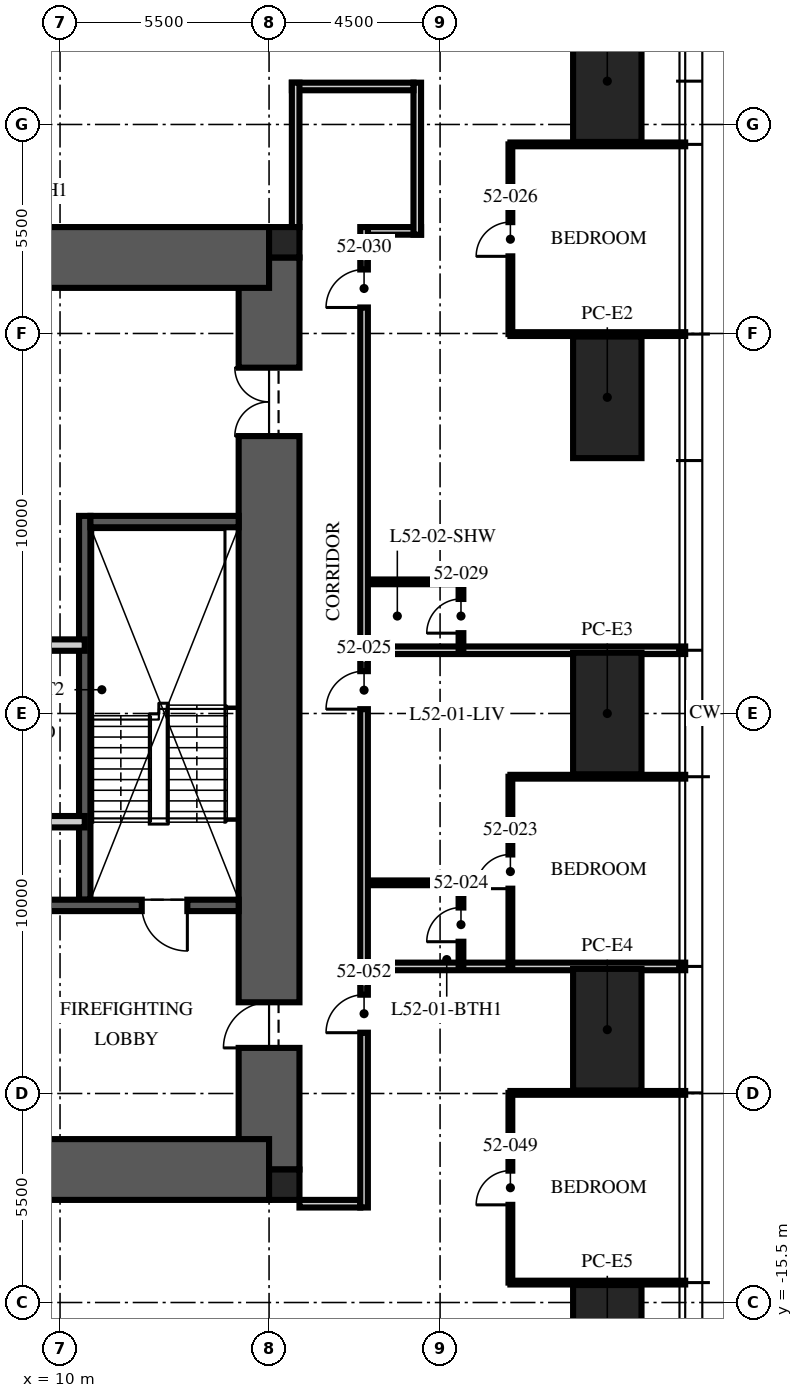
"""IFC4 building model, lengths in metres.
Left out: names, types, materials, properties, quantities, classifications, styles, units other than length and angle.
Written with IfcOpenShell. Run it as: python <this file> out.ifc"""

import sys

from ifc_helpers import new_model, si_unit, direction, frame, frame_2d, origin, origin_2d, place, context, subcontext, project, spatial, rectangle, hollow_rectangle, extrude, element, fill, save


model = new_model("IFC4")
c1 = context("Model", 3, precision=1e-05, world=origin(), true_north=direction((0.0, 1.0)))
c2 = subcontext(c1, "Body", "Model", "MODEL_VIEW")
j1 = project(units=[si_unit("LENGTHUNIT", "METRE"), si_unit("PLANEANGLEUNIT", "RADIAN")], contexts=[c1])
p1 = place(None, origin())
s1 = spatial("IfcSite", under=j1, at=p1, CompositionType="ELEMENT")
p2 = place(p1, origin())
s2 = spatial("IfcBuilding", under=s1, at=p2, CompositionType="ELEMENT")
p3 = place(p2, frame((0.0, 0.0, 210.75)))
s3 = spatial("IfcBuildingStorey", under=s2, at=p3, CompositionType="ELEMENT", Elevation=210.75)
p4 = place(p3, frame((15.5, -12.0, -0.25), z_axis=(0.0, 0.0, 1.0), x_axis=(0.0, 1.0, 0.0)))
e1 = element("IfcWall", 1, at=p4, inside=s3, PredefinedType="SHEAR", context=c2, shape_type="SweptSolid", body=[
    extrude(rectangle(XDim=24.0, YDim=1.6, at=frame_2d((12.0, 0.0))), origin(), (0.0, 0.0, 1.0), 3.75),
])
p5 = place(p4, frame((3.2, 0.0, 0.25)))
e2 = element("IfcOpeningElement", 2, at=p5, cuts=e1, PredefinedType="OPENING", context=c2, shape_type="SweptSolid", body=[
    extrude(rectangle(XDim=1.2, YDim=2.1, at=frame_2d((0.6, 1.05))), frame((0.0, 0.81, 0.0), z_axis=(0.0, -1.0, 0.0), x_axis=(1.0, 0.0, 0.0)), (0.0, 0.0, 1.0), 1.62),
])
p6 = place(p4, frame((19.3, 0.0, 0.25)))
e3 = element("IfcOpeningElement", 3, at=p6, cuts=e1, PredefinedType="OPENING", context=c2, shape_type="SweptSolid", body=[
    extrude(rectangle(XDim=1.8, YDim=2.1, at=frame_2d((0.9, 1.05))), frame((0.0, 0.81, 0.0), z_axis=(0.0, -1.0, 0.0), x_axis=(1.0, 0.0, 0.0)), (0.0, 0.0, 1.0), 1.62),
])
for number, where, z_axis, x_axis in (
    (4, (-15.5, 12.0, -0.25), (0.0, 0.0, 1.0), (1.0, 0.0, 0.0)),
    (5, (-15.5, -12.0, -0.25), (0.0, 0.0, 1.0), (1.0, 0.0, 0.0)),
):
    element("IfcWall", number, at=place(p3, frame(where, z_axis=z_axis, x_axis=x_axis)), inside=s3, PredefinedType="SHEAR", context=c2, shape_type="SweptSolid", body=[
        extrude(rectangle(XDim=31.0, YDim=1.6, at=frame_2d((15.5, 0.0))), origin(), (0.0, 0.0, 1.0), 3.75),
    ])
for number, where, z_axis, x_axis in (
    (6, (15.9, 12.4, -0.25), (0.0, 0.0, 1.0), (1.0, 0.0, 0.0)),
    (7, (15.9, -12.4, -0.25), (0.0, 0.0, 1.0), (1.0, 0.0, 0.0)),
):
    element("IfcColumn", number, at=place(p3, frame(where, z_axis=z_axis, x_axis=x_axis)), inside=s3, PredefinedType="COLUMN", context=c2, shape_type="SweptSolid", body=[
        extrude(rectangle(XDim=0.8, YDim=0.8, at=origin_2d()), origin(), (0.0, 0.0, 1.0), 3.75),
    ])
for number, where, z_axis, x_axis in (
    (8, (24.4, 16.64, 0.0), (0.0, 0.0, 1.0), (0.0, 1.0, 0.0)),
    (9, (24.4, 8.32, 0.0), (0.0, 0.0, 1.0), (0.0, 1.0, 0.0)),
    (10, (24.4, 0.0, 0.0), (0.0, 0.0, 1.0), (0.0, 1.0, 0.0)),
    (11, (24.4, -8.32, 0.0), (0.0, 0.0, 1.0), (0.0, 1.0, 0.0)),
    (12, (24.4, -16.64, 0.0), (0.0, 0.0, 1.0), (0.0, 1.0, 0.0)),
):
    element("IfcColumn", number, at=place(p3, frame(where, z_axis=z_axis, x_axis=x_axis)), inside=s3, PredefinedType="COLUMN", context=c2, shape_type="SweptSolid", body=[
        extrude(hollow_rectangle(XDim=3.2, YDim=1.8, WallThickness=0.2, at=origin_2d()), origin(), (0.0, 0.0, 1.0), 3.75),
    ])
p7 = place(p3, frame((10.65, -4.9, 0.0), z_axis=(0.0, 0.0, 1.0), x_axis=(0.0, 1.0, 0.0)))
e13 = element("IfcWall", 13, at=p7, inside=s3, PredefinedType="SOLIDWALL", context=c2, shape_type="SweptSolid", body=[
    extrude(rectangle(XDim=10.1, YDim=0.3, at=frame_2d((5.05, 0.0))), origin(), (0.0, 0.0, 1.0), 3.5),
])
p8 = place(p3, frame((14.7, -5.05, 0.0), z_axis=(0.0, 0.0, 1.0), x_axis=(-1.0, 0.0, 0.0)))
e14 = element("IfcWall", 14, at=p8, inside=s3, PredefinedType="SOLIDWALL", context=c2, shape_type="SweptSolid", body=[
    extrude(rectangle(XDim=5.9, YDim=0.3, at=frame_2d((2.95, 0.0))), origin(), (0.0, 0.0, 1.0), 3.5),
])
p9 = place(p8, frame((1.35, 0.0, 0.0)))
e15 = element("IfcOpeningElement", 15, at=p9, cuts=e14, PredefinedType="OPENING", context=c2, shape_type="SweptSolid", body=[
    extrude(rectangle(XDim=1.2, YDim=2.1, at=frame_2d((0.6, 1.05))), frame((0.0, 0.16, 0.0), z_axis=(0.0, -1.0, 0.0), x_axis=(1.0, 0.0, 0.0)), (0.0, 0.0, 1.0), 0.32),
])
p10 = place(p3, frame((14.7, 5.05, 0.0), z_axis=(0.0, 0.0, 1.0), x_axis=(-1.0, 0.0, 0.0)))
e16 = element("IfcWall", 16, at=p10, inside=s3, PredefinedType="SOLIDWALL", context=c2, shape_type="SweptSolid", body=[
    extrude(rectangle(XDim=3.9, YDim=0.3, at=frame_2d((1.95, 0.0))), origin(), (0.0, 0.0, 1.0), 3.5),
])
p11 = place(p3, frame((-10.65, 1.8, 0.0), z_axis=(0.0, 0.0, 1.0), x_axis=(1.0, 0.0, 0.0)))
e17 = element("IfcWall", 17, at=p11, inside=s3, PredefinedType="PARTITIONING", context=c2, shape_type="SweptSolid", body=[
    extrude(rectangle(XDim=21.3, YDim=0.3, at=frame_2d((10.65, 0.0))), origin(), (0.0, 0.0, 1.0), 3.5),
])
p12 = place(p11, frame((10.05, 0.0, 0.0)))
e18 = element("IfcOpeningElement", 18, at=p12, cuts=e17, PredefinedType="OPENING", context=c2, shape_type="SweptSolid", body=[
    extrude(rectangle(XDim=1.2, YDim=2.1, at=frame_2d((0.6, 1.05))), frame((0.0, 0.16, 0.0), z_axis=(0.0, -1.0, 0.0), x_axis=(1.0, 0.0, 0.0)), (0.0, 0.0, 1.0), 0.32),
])
p13 = place(p11, frame((19.238, 0.0, 0.0)))
e19 = element("IfcOpeningElement", 19, at=p13, cuts=e17, PredefinedType="OPENING", context=c2, shape_type="SweptSolid", body=[
    extrude(rectangle(XDim=0.9, YDim=2.1, at=frame_2d((0.45, 1.05))), frame((0.0, 0.16, 0.0), z_axis=(0.0, -1.0, 0.0), x_axis=(1.0, 0.0, 0.0)), (0.0, 0.0, 1.0), 0.32),
])
p14 = place(p3, frame((10.65, -2.848, 0.0), z_axis=(0.0, 0.0, 1.0), x_axis=(-1.0, 0.0, 0.0)))
e20 = element("IfcWall", 20, at=p14, inside=s3, PredefinedType="PARTITIONING", context=c2, shape_type="SweptSolid", body=[
    extrude(rectangle(XDim=6.45, YDim=0.3, at=frame_2d((3.225, 0.0))), origin(), (0.0, 0.0, 1.0), 3.5),
])
p15 = place(p3, frame((18.1, 12.7, 0.0), z_axis=(0.0, 0.0, 1.0), x_axis=(1.0, 0.0, 0.0)))
e21 = element("IfcWall", 21, at=p15, inside=s3, PredefinedType="PARTITIONING", context=c2, shape_type="SweptSolid", body=[
    extrude(rectangle(XDim=1.4, YDim=0.2, at=frame_2d((0.7, 0.0))), origin(), (0.0, 0.0, 1.0), 2.81),
])
p16 = place(p3, frame((19.4, 12.6, 0.0), z_axis=(0.0, 0.0, 1.0), x_axis=(0.0, 1.0, 0.0)))
e22 = element("IfcWall", 22, at=p16, inside=s3, PredefinedType="PARTITIONING", context=c2, shape_type="SweptSolid", body=[
    extrude(rectangle(XDim=4.0, YDim=0.2, at=frame_2d((2.0, 0.0))), origin(), (0.0, 0.0, 1.0), 2.6),
])
p17 = place(p3, frame((19.3, 16.5, 0.0), z_axis=(0.0, 0.0, 1.0), x_axis=(-1.0, 0.0, 0.0)))
e23 = element("IfcWall", 23, at=p17, inside=s3, PredefinedType="PARTITIONING", context=c2, shape_type="SweptSolid", body=[
    extrude(rectangle(XDim=3.2, YDim=0.2, at=frame_2d((1.6, 0.0))), origin(), (0.0, 0.0, 1.0), 2.3),
])
p18 = place(p3, frame((16.2, 16.6, 0.0), z_axis=(0.0, 0.0, 1.0), x_axis=(0.0, -1.0, 0.0)))
e24 = element("IfcWall", 24, at=p18, inside=s3, PredefinedType="PARTITIONING", context=c2, shape_type="SweptSolid", body=[
    extrude(rectangle(XDim=3.8, YDim=0.2, at=frame_2d((1.9, 0.0))), origin(), (0.0, 0.0, 1.0), 2.3),
])
p19 = place(p3, frame((16.3, -12.9, 0.0), z_axis=(0.0, 0.0, 1.0), x_axis=(1.0, 0.0, 0.0)))
e25 = element("IfcWall", 25, at=p19, inside=s3, PredefinedType="PARTITIONING", context=c2, shape_type="SweptSolid", body=[
    extrude(rectangle(XDim=1.6, YDim=0.2, at=frame_2d((0.8, 0.0))), origin(), (0.0, 0.0, 1.0), 2.3),
])
p20 = place(p3, frame((18.1, -6.656, 0.0), z_axis=(0.0, 0.0, 1.0), x_axis=(1.0, 0.0, 0.0)))
e26 = element("IfcWall", 26, at=p20, inside=s3, PredefinedType="PARTITIONING", context=c2, shape_type="SweptSolid", body=[
    extrude(rectangle(XDim=8.35, YDim=0.2, at=frame_2d((4.175, 0.0))), origin(), (0.0, 0.0, 1.0), 2.91),
])
p21 = place(p3, frame((21.85, -1.664, 0.0), z_axis=(0.0, 0.0, 1.0), x_axis=(1.0, 0.0, 0.0)))
e27 = element("IfcWall", 27, at=p21, inside=s3, PredefinedType="PARTITIONING", context=c2, shape_type="SweptSolid", body=[
    extrude(rectangle(XDim=4.6, YDim=0.1, at=frame_2d((2.3, 0.0))), origin(), (0.0, 0.0, 1.0), 2.91),
])
p22 = place(p3, frame((18.1, 1.664, 0.0), z_axis=(0.0, 0.0, 1.0), x_axis=(1.0, 0.0, 0.0)))
e28 = element("IfcWall", 28, at=p22, inside=s3, PredefinedType="PARTITIONING", context=c2, shape_type="SweptSolid", body=[
    extrude(rectangle(XDim=8.35, YDim=0.2, at=frame_2d((4.175, 0.0))), origin(), (0.0, 0.0, 1.0), 2.91),
])
for number, where, z_axis, x_axis in (
    (29, (21.85, 9.984, 0.0), (0.0, 0.0, 1.0), (1.0, 0.0, 0.0)),
    (30, (21.85, 14.976, 0.0), (0.0, 0.0, 1.0), (1.0, 0.0, 0.0)),
    (31, (21.85, -14.976, 0.0), (0.0, 0.0, 1.0), (1.0, 0.0, 0.0)),
    (32, (21.85, -9.984, 0.0), (0.0, 0.0, 1.0), (1.0, 0.0, 0.0)),
):
    element("IfcWall", number, at=place(p3, frame(where, z_axis=z_axis, x_axis=x_axis)), inside=s3, PredefinedType="PARTITIONING", context=c2, shape_type="SweptSolid", body=[
        extrude(rectangle(XDim=4.6, YDim=0.1, at=frame_2d((2.3, 0.0))), origin(), (0.0, 0.0, 1.0), 2.91),
    ])
p23 = place(p3, frame((21.85, -6.656, 0.0), z_axis=(0.0, 0.0, 1.0), x_axis=(0.0, 1.0, 0.0)))
e33 = element("IfcWall", 33, at=p23, inside=s3, PredefinedType="PARTITIONING", context=c2, shape_type="SweptSolid", body=[
    extrude(rectangle(XDim=4.992, YDim=0.1, at=frame_2d((2.496, 0.0))), origin(), (0.0, 0.0, 1.0), 2.81),
])
p24 = place(p23, frame((2.046, 0.0, 0.0)))
e34 = element("IfcOpeningElement", 34, at=p24, cuts=e33, PredefinedType="OPENING", context=c2, shape_type="SweptSolid", body=[
    extrude(rectangle(XDim=0.9, YDim=2.1, at=frame_2d((0.45, 1.05))), frame((0.0, 0.06, 0.0), z_axis=(0.0, -1.0, 0.0), x_axis=(1.0, 0.0, 0.0)), (0.0, 0.0, 1.0), 0.12),
])
p25 = place(p3, frame((20.55, -6.656, 0.0), z_axis=(0.0, 0.0, 1.0), x_axis=(0.0, 1.0, 0.0)))
e35 = element("IfcWall", 35, at=p25, inside=s3, PredefinedType="PARTITIONING", context=c2, shape_type="SweptSolid", body=[
    extrude(rectangle(XDim=2.2, YDim=0.125, at=frame_2d((1.1, 0.0))), origin(), (0.0, 0.0, 1.0), 3.5),
])
p26 = place(p25, frame((0.65, 0.0, 0.0)))
e36 = element("IfcOpeningElement", 36, at=p26, cuts=e35, PredefinedType="OPENING", context=c2, shape_type="SweptSolid", body=[
    extrude(rectangle(XDim=0.9, YDim=2.1, at=frame_2d((0.45, 1.05))), frame((0.0, 0.073, 0.0), z_axis=(0.0, -1.0, 0.0), x_axis=(1.0, 0.0, 0.0)), (0.0, 0.0, 1.0), 0.145),
])
p27 = place(p3, frame((18.1, -4.456, 0.0), z_axis=(0.0, 0.0, 1.0), x_axis=(1.0, 0.0, 0.0)))
e37 = element("IfcWall", 37, at=p27, inside=s3, PredefinedType="PARTITIONING", context=c2, shape_type="SweptSolid", body=[
    extrude(rectangle(XDim=2.45, YDim=0.125, at=frame_2d((1.225, 0.0))), origin(), (0.0, 0.0, 1.0), 3.5),
])
p28 = place(p3, frame((21.85, 9.984, 0.0), z_axis=(0.0, 0.0, 1.0), x_axis=(0.0, 1.0, 0.0)))
e38 = element("IfcWall", 38, at=p28, inside=s3, PredefinedType="PARTITIONING", context=c2, shape_type="SweptSolid", body=[
    extrude(rectangle(XDim=4.992, YDim=0.1, at=frame_2d((2.496, 0.0))), origin(), (0.0, 0.0, 1.0), 2.81),
])
p29 = place(p28, frame((2.046, 0.0, 0.0)))
e39 = element("IfcOpeningElement", 39, at=p29, cuts=e38, PredefinedType="OPENING", context=c2, shape_type="SweptSolid", body=[
    extrude(rectangle(XDim=0.9, YDim=2.1, at=frame_2d((0.45, 1.05))), frame((0.0, 0.06, 0.0), z_axis=(0.0, -1.0, 0.0), x_axis=(1.0, 0.0, 0.0)), (0.0, 0.0, 1.0), 0.12),
])
p30 = place(p3, frame((20.55, 1.664, 0.0), z_axis=(0.0, 0.0, 1.0), x_axis=(0.0, 1.0, 0.0)))
e40 = element("IfcWall", 40, at=p30, inside=s3, PredefinedType="PARTITIONING", context=c2, shape_type="SweptSolid", body=[
    extrude(rectangle(XDim=1.8, YDim=0.125, at=frame_2d((0.9, 0.0))), origin(), (0.0, 0.0, 1.0), 3.5),
])
p31 = place(p30, frame((0.45, 0.0, 0.0)))
e41 = element("IfcOpeningElement", 41, at=p31, cuts=e40, PredefinedType="OPENING", context=c2, shape_type="SweptSolid", body=[
    extrude(rectangle(XDim=0.9, YDim=2.1, at=frame_2d((0.45, 1.05))), frame((0.0, 0.073, 0.0), z_axis=(0.0, -1.0, 0.0), x_axis=(1.0, 0.0, 0.0)), (0.0, 0.0, 1.0), 0.145),
])
p32 = place(p3, frame((18.1, 3.464, 0.0), z_axis=(0.0, 0.0, 1.0), x_axis=(1.0, 0.0, 0.0)))
e42 = element("IfcWall", 42, at=p32, inside=s3, PredefinedType="PARTITIONING", context=c2, shape_type="SweptSolid", body=[
    extrude(rectangle(XDim=2.45, YDim=0.125, at=frame_2d((1.225, 0.0))), origin(), (0.0, 0.0, 1.0), 3.5),
])
p33 = place(p3, frame((21.85, -14.976, 0.0), z_axis=(0.0, 0.0, 1.0), x_axis=(0.0, 1.0, 0.0)))
e43 = element("IfcWall", 43, at=p33, inside=s3, PredefinedType="PARTITIONING", context=c2, shape_type="SweptSolid", body=[
    extrude(rectangle(XDim=4.992, YDim=0.1, at=frame_2d((2.496, 0.0))), origin(), (0.0, 0.0, 1.0), 2.81),
])
p34 = place(p33, frame((2.046, 0.0, 0.0)))
e44 = element("IfcOpeningElement", 44, at=p34, cuts=e43, PredefinedType="OPENING", context=c2, shape_type="SweptSolid", body=[
    extrude(rectangle(XDim=0.9, YDim=2.1, at=frame_2d((0.45, 1.05))), frame((0.0, 0.06, 0.0), z_axis=(0.0, -1.0, 0.0), x_axis=(1.0, 0.0, 0.0)), (0.0, 0.0, 1.0), 0.12),
])
p35 = place(p3, frame((18.0, -13.0, 0.0), z_axis=(0.0, 0.0, 1.0), x_axis=(0.0, 1.0, 0.0)))
e45 = element("IfcWall", 45, at=p35, inside=s3, PredefinedType="PARTITIONING", context=c2, shape_type="SweptSolid", body=[
    extrude(rectangle(XDim=25.8, YDim=0.2, at=frame_2d((12.9, 0.0))), origin(), (0.0, 0.0, 1.0), 2.6),
])
p36 = place(p35, frame((13.114, 0.0, 0.0)))
e46 = element("IfcOpeningElement", 46, at=p36, cuts=e45, PredefinedType="OPENING", context=c2, shape_type="SweptSolid", body=[
    extrude(rectangle(XDim=1.0, YDim=2.2, at=frame_2d((0.5, 1.1))), frame((0.0, 0.11, 0.0), z_axis=(0.0, -1.0, 0.0), x_axis=(1.0, 0.0, 0.0)), (0.0, 0.0, 1.0), 0.22),
])
p37 = place(p35, frame((23.684, 0.0, 0.0)))
e47 = element("IfcOpeningElement", 47, at=p37, cuts=e45, PredefinedType="OPENING", context=c2, shape_type="SweptSolid", body=[
    extrude(rectangle(XDim=1.0, YDim=2.2, at=frame_2d((0.5, 1.1))), frame((0.0, 0.11, 0.0), z_axis=(0.0, -1.0, 0.0), x_axis=(1.0, 0.0, 0.0)), (0.0, 0.0, 1.0), 0.22),
])
p38 = place(p35, frame((4.6, 0.0, 0.0)))
e48 = element("IfcOpeningElement", 48, at=p38, cuts=e45, PredefinedType="OPENING", context=c2, shape_type="SweptSolid", body=[
    extrude(rectangle(XDim=1.0, YDim=2.2, at=frame_2d((0.5, 1.1))), frame((0.0, 0.11, 0.0), z_axis=(0.0, -1.0, 0.0), x_axis=(1.0, 0.0, 0.0)), (0.0, 0.0, 1.0), 0.22),
])
p39 = place(p9, origin())
e49 = element("IfcDoor", 49, at=p39, inside=s3, OperationType="SINGLE_SWING_LEFT", PredefinedType="DOOR", context=c2, shape_type="SweptSolid", body=[
    extrude(rectangle(XDim=1.2, YDim=2.1, at=frame_2d((0.6, 1.05))), frame((0.0, 0.025, 0.0), z_axis=(0.0, -1.0, 0.0), x_axis=(1.0, 0.0, 0.0)), (0.0, 0.0, 1.0), 0.05),
])
fill(e15, e49)
p40 = place(p5, origin())
e50 = element("IfcDoor", 50, at=p40, inside=s3, OperationType="SINGLE_SWING_LEFT", PredefinedType="DOOR", context=c2, shape_type="SweptSolid", body=[
    extrude(rectangle(XDim=1.2, YDim=2.1, at=frame_2d((0.6, 1.05))), frame((0.0, 0.025, 0.0), z_axis=(0.0, -1.0, 0.0), x_axis=(1.0, 0.0, 0.0)), (0.0, 0.0, 1.0), 0.05),
])
fill(e2, e50)
p41 = place(p6, origin())
e51 = element("IfcDoor", 51, at=p41, inside=s3, OperationType="DOUBLE_DOOR_SINGLE_SWING", PredefinedType="DOOR", context=c2, shape_type="SweptSolid", body=[
    extrude(rectangle(XDim=1.8, YDim=2.1, at=frame_2d((0.9, 1.05))), frame((0.0, 0.025, 0.0), z_axis=(0.0, -1.0, 0.0), x_axis=(1.0, 0.0, 0.0)), (0.0, 0.0, 1.0), 0.05),
])
fill(e3, e51)
p42 = place(p24, origin())
e52 = element("IfcDoor", 52, at=p42, inside=s3, OperationType="SINGLE_SWING_LEFT", PredefinedType="DOOR", context=c2, shape_type="SweptSolid", body=[
    extrude(rectangle(XDim=0.9, YDim=2.1, at=frame_2d((0.45, 1.05))), frame((0.0, 0.025, 0.0), z_axis=(0.0, -1.0, 0.0), x_axis=(1.0, 0.0, 0.0)), (0.0, 0.0, 1.0), 0.05),
])
fill(e34, e52)
p43 = place(p26, origin())
e53 = element("IfcDoor", 53, at=p43, inside=s3, OperationType="SINGLE_SWING_LEFT", PredefinedType="DOOR", context=c2, shape_type="SweptSolid", body=[
    extrude(rectangle(XDim=0.9, YDim=2.1, at=frame_2d((0.45, 1.05))), frame((0.0, 0.025, 0.0), z_axis=(0.0, -1.0, 0.0), x_axis=(1.0, 0.0, 0.0)), (0.0, 0.0, 1.0), 0.05),
])
fill(e36, e53)
p44 = place(p36, origin())
e54 = element("IfcDoor", 54, at=p44, inside=s3, OperationType="SINGLE_SWING_LEFT", PredefinedType="DOOR", context=c2, shape_type="SweptSolid", body=[
    extrude(rectangle(XDim=1.0, YDim=2.2, at=frame_2d((0.5, 1.1))), frame((0.0, 0.025, 0.0), z_axis=(0.0, -1.0, 0.0), x_axis=(1.0, 0.0, 0.0)), (0.0, 0.0, 1.0), 0.05),
])
fill(e46, e54)
p45 = place(p29, origin())
e55 = element("IfcDoor", 55, at=p45, inside=s3, OperationType="SINGLE_SWING_LEFT", PredefinedType="DOOR", context=c2, shape_type="SweptSolid", body=[
    extrude(rectangle(XDim=0.9, YDim=2.1, at=frame_2d((0.45, 1.05))), frame((0.0, 0.025, 0.0), z_axis=(0.0, -1.0, 0.0), x_axis=(1.0, 0.0, 0.0)), (0.0, 0.0, 1.0), 0.05),
])
fill(e39, e55)
p46 = place(p31, origin())
e56 = element("IfcDoor", 56, at=p46, inside=s3, OperationType="SINGLE_SWING_LEFT", PredefinedType="DOOR", context=c2, shape_type="SweptSolid", body=[
    extrude(rectangle(XDim=0.9, YDim=2.1, at=frame_2d((0.45, 1.05))), frame((0.0, 0.025, 0.0), z_axis=(0.0, -1.0, 0.0), x_axis=(1.0, 0.0, 0.0)), (0.0, 0.0, 1.0), 0.05),
])
fill(e41, e56)
p47 = place(p37, origin())
e57 = element("IfcDoor", 57, at=p47, inside=s3, OperationType="SINGLE_SWING_LEFT", PredefinedType="DOOR", context=c2, shape_type="SweptSolid", body=[
    extrude(rectangle(XDim=1.0, YDim=2.2, at=frame_2d((0.5, 1.1))), frame((0.0, 0.025, 0.0), z_axis=(0.0, -1.0, 0.0), x_axis=(1.0, 0.0, 0.0)), (0.0, 0.0, 1.0), 0.05),
])
fill(e47, e57)
p48 = place(p34, origin())
e58 = element("IfcDoor", 58, at=p48, inside=s3, OperationType="SINGLE_SWING_LEFT", PredefinedType="DOOR", context=c2, shape_type="SweptSolid", body=[
    extrude(rectangle(XDim=0.9, YDim=2.1, at=frame_2d((0.45, 1.05))), frame((0.0, 0.025, 0.0), z_axis=(0.0, -1.0, 0.0), x_axis=(1.0, 0.0, 0.0)), (0.0, 0.0, 1.0), 0.05),
])
fill(e44, e58)
p49 = place(p38, origin())
e59 = element("IfcDoor", 59, at=p49, inside=s3, OperationType="SINGLE_SWING_LEFT", PredefinedType="DOOR", context=c2, shape_type="SweptSolid", body=[
    extrude(rectangle(XDim=1.0, YDim=2.2, at=frame_2d((0.5, 1.1))), frame((0.0, 0.025, 0.0), z_axis=(0.0, -1.0, 0.0), x_axis=(1.0, 0.0, 0.0)), (0.0, 0.0, 1.0), 0.05),
])
fill(e48, e59)
save(model, sys.argv[1])
